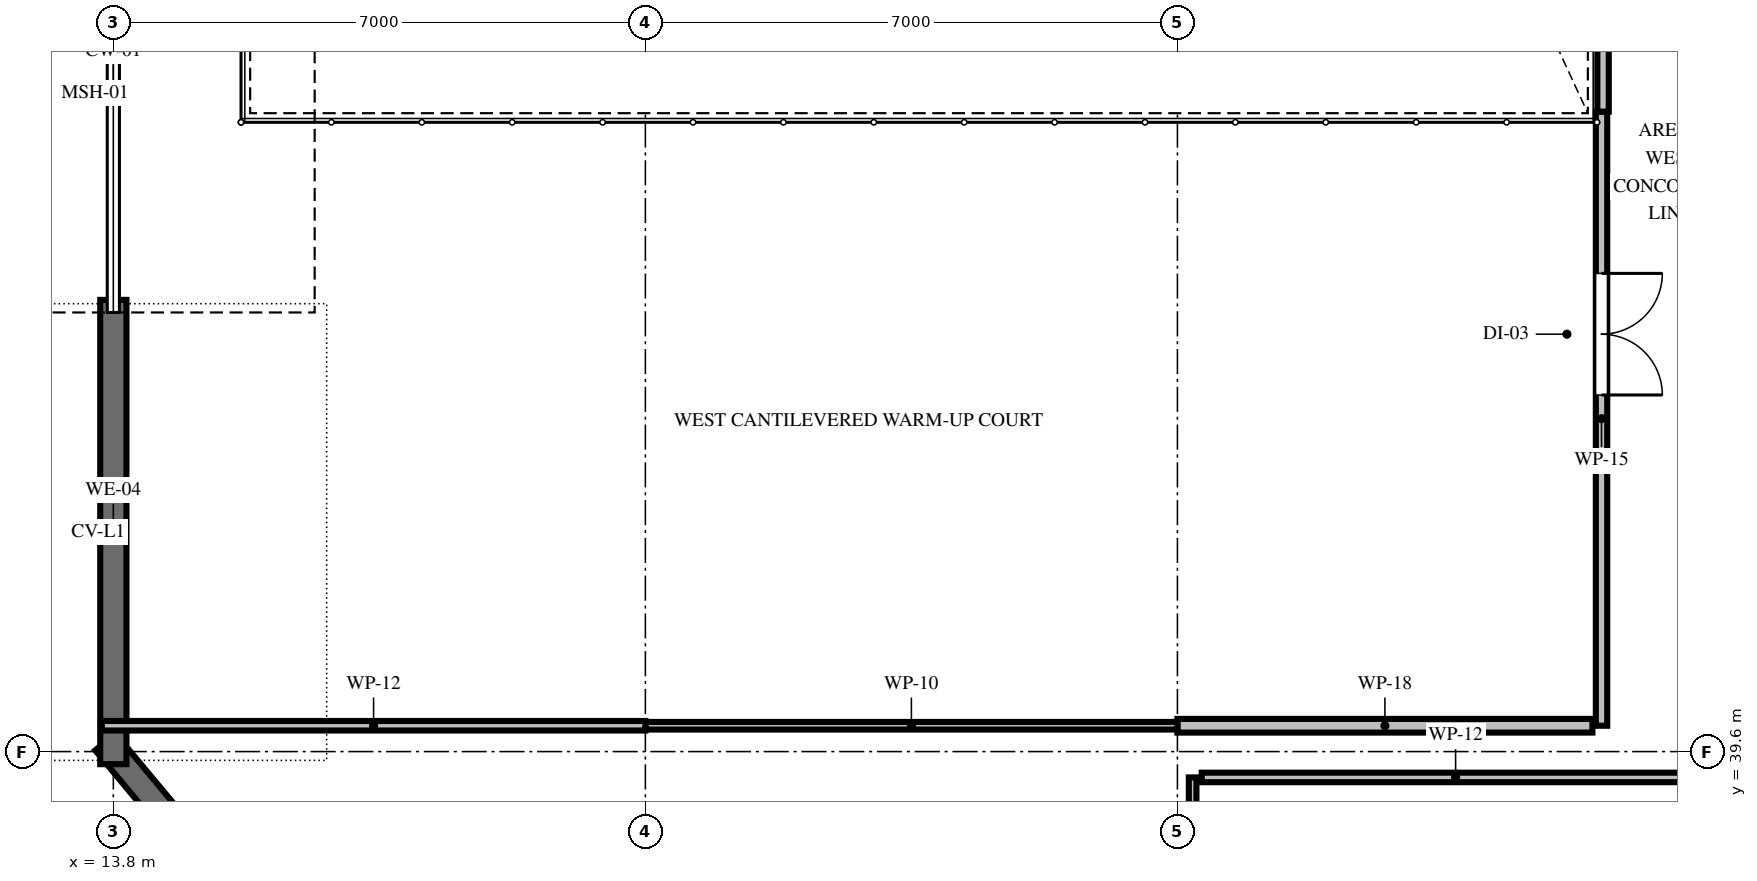
"""IFC4 building model, lengths in metres.
Left out: names, types, materials, properties, quantities, classifications, styles, units other than length and angle.
Written with IfcOpenShell. Run it as: python <this file> out.ifc"""

import sys

from ifc_helpers import new_model, si_unit, direction, frame, frame_2d, origin, place, context, subcontext, project, spatial, rectangle, extrude, element, fill, save


model = new_model("IFC4")
c1 = context("Model", 3, precision=1e-05, world=origin(), true_north=direction((0.0, 1.0)))
c2 = subcontext(c1, "Body", "Model", "MODEL_VIEW")
j1 = project(units=[si_unit("LENGTHUNIT", "METRE"), si_unit("PLANEANGLEUNIT", "RADIAN")], contexts=[c1])
p1 = place(None, origin())
s1 = spatial("IfcSite", under=j1, at=p1, CompositionType="ELEMENT")
p2 = place(p1, origin())
s2 = spatial("IfcBuilding", under=s1, at=p2, CompositionType="ELEMENT")
p3 = place(p2, frame((0.0, 0.0, 10.8)))
s3 = spatial("IfcBuildingStorey", under=s2, at=p3, CompositionType="ELEMENT", Elevation=10.8)
p4 = place(p3, frame((17.406, 35.273, 0.0), z_axis=(0.0, 0.0, 1.0), x_axis=(-0.640159550666, 0.768241986415, 0.0)))
e1 = element("IfcWall", 1, at=p4, inside=s3, PredefinedType="SOLIDWALL", context=c2, shape_type="SweptSolid", body=[
    extrude(rectangle(XDim=5.798, YDim=0.345, at=frame_2d((2.899, 0.0))), origin(), (0.0, 0.0, 1.0), 5.08),
])
p5 = place(p3, frame((13.8, 39.434, 0.0), z_axis=(0.0, 0.0, 1.0), x_axis=(0.0, 1.0, 0.0)))
e2 = element("IfcWall", 2, at=p5, inside=s3, PredefinedType="SOLIDWALL", context=c2, shape_type="SweptSolid", body=[
    extrude(rectangle(XDim=6.109, YDim=0.345, at=frame_2d((3.055, 0.0))), origin(), (0.0, 0.0, 1.0), 5.08),
])
p6 = place(p3, frame((33.38, 48.02, 0.0), z_axis=(0.0, 0.0, 1.0), x_axis=(0.0, -1.0, 0.0)))
e3 = element("IfcWall", 3, at=p6, inside=s3, PredefinedType="PARTITIONING", context=c2, shape_type="SweptSolid", body=[
    extrude(rectangle(XDim=8.08, YDim=0.15, at=frame_2d((4.04, 0.0))), origin(), (0.0, 0.0, 1.0), 5.65),
])
p7 = place(p6, frame((2.128, 0.0, 0.0)))
e4 = element("IfcOpeningElement", 4, at=p7, cuts=e3, PredefinedType="OPENING", context=c2, shape_type="SweptSolid", body=[
    extrude(rectangle(XDim=1.6, YDim=2.2, at=frame_2d((0.8, 1.1))), frame((0.0, 0.085, 0.0), z_axis=(0.0, -1.0, 0.0), x_axis=(1.0, 0.0, 0.0)), (0.0, 0.0, 1.0), 0.17),
])
p8 = place(p3, frame((33.26, 39.94, 0.0), z_axis=(0.0, 0.0, 1.0), x_axis=(-1.0, 0.0, 0.0)))
e5 = element("IfcWall", 5, at=p8, inside=s3, PredefinedType="PARTITIONING", context=c2, shape_type="SweptSolid", body=[
    extrude(rectangle(XDim=5.46, YDim=0.18, at=frame_2d((2.73, 0.0))), origin(), (0.0, 0.0, 1.0), 5.65),
])
p9 = place(p3, frame((27.8, 39.94, 0.0), z_axis=(0.0, 0.0, 1.0), x_axis=(-1.0, 0.0, 0.0)))
e6 = element("IfcWall", 6, at=p9, inside=s3, PredefinedType="PARTITIONING", context=c2, shape_type="SweptSolid", body=[
    extrude(rectangle(XDim=7.0, YDim=0.1, at=frame_2d((3.5, 0.0))), origin(), (0.0, 0.0, 1.0), 5.28),
])
p10 = place(p3, frame((20.8, 39.94, 0.0), z_axis=(0.0, 0.0, 1.0), x_axis=(-1.0, 0.0, 0.0)))
e7 = element("IfcWall", 7, at=p10, inside=s3, PredefinedType="PARTITIONING", context=c2, shape_type="SweptSolid", body=[
    extrude(rectangle(XDim=7.152, YDim=0.125, at=frame_2d((3.576, 0.0))), origin(), (0.0, 0.0, 1.0), 5.28),
])
p11 = place(p3, frame((28.0, 28.6, 0.0), z_axis=(0.0, 0.0, 1.0), x_axis=(0.0, 1.0, 0.0)))
e8 = element("IfcWall", 8, at=p11, inside=s3, PredefinedType="PARTITIONING", context=c2, shape_type="SweptSolid", body=[
    extrude(rectangle(XDim=10.66, YDim=0.1, at=frame_2d((5.33, 0.0))), origin(), (0.0, 0.0, 1.0), 5.65),
])
p12 = place(p3, frame((28.12, 39.26, 0.0), z_axis=(0.0, 0.0, 1.0), x_axis=(1.0, 0.0, 0.0)))
e9 = element("IfcWall", 9, at=p12, inside=s3, PredefinedType="PARTITIONING", context=c2, shape_type="SweptSolid", body=[
    extrude(rectangle(XDim=6.68, YDim=0.125, at=frame_2d((3.34, 0.0))), origin(), (0.0, 0.0, 1.0), 5.65),
])
p13 = place(p3, frame((33.4, 48.02, 0.0), z_axis=(0.0, 0.0, 1.0), x_axis=(0.0, 1.0, 0.0)))
e10 = element("IfcWall", 10, at=p13, inside=s3, PredefinedType="PARTITIONING", context=c2, shape_type="SweptSolid", body=[
    extrude(rectangle(XDim=38.4, YDim=0.15, at=frame_2d((19.2, 0.0))), origin(), (0.0, 0.0, 1.0), 5.082),
])
p14 = place(p7, origin())
e11 = element("IfcDoor", 11, at=p14, inside=s3, OperationType="DOUBLE_DOOR_SINGLE_SWING", PredefinedType="DOOR", context=c2, shape_type="SweptSolid", body=[
    extrude(rectangle(XDim=1.6, YDim=2.2, at=frame_2d((0.8, 1.1))), frame((0.0, 0.025, 0.0), z_axis=(0.0, -1.0, 0.0), x_axis=(1.0, 0.0, 0.0)), (0.0, 0.0, 1.0), 0.05),
])
fill(e4, e11)
save(model, sys.argv[1])
